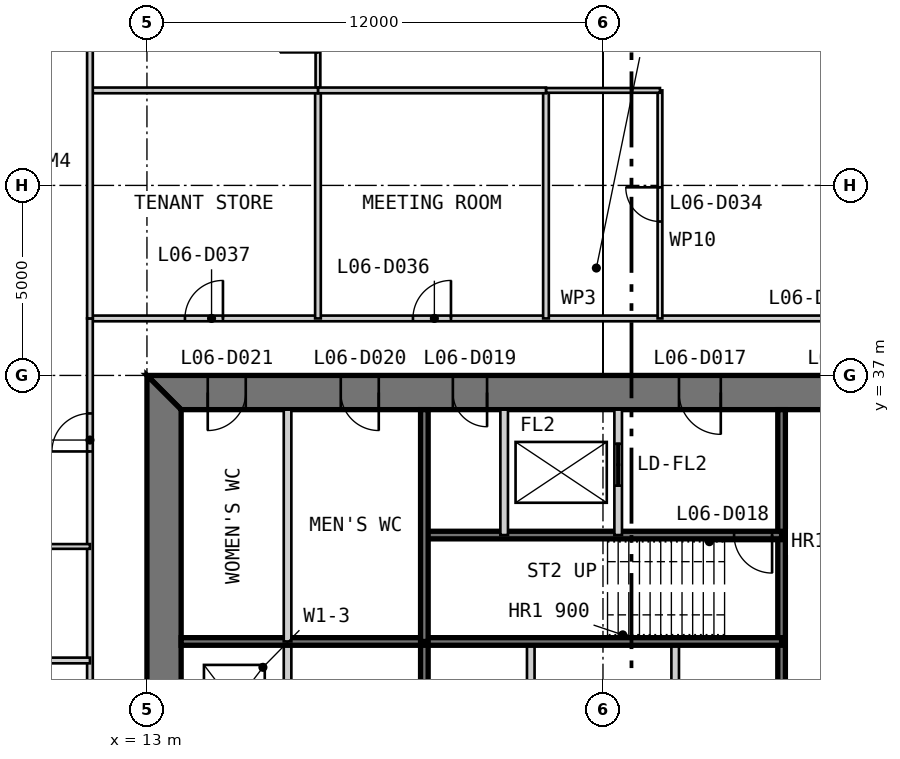
"""IFC4 building model, lengths in metres.
Left out: names, types, materials, properties, quantities, classifications, styles, units other than length and angle.
Written with IfcOpenShell. Run it as: python <this file> out.ifc"""

import sys

from ifc_helpers import new_model, si_unit, direction, frame, frame_2d, origin, place, context, subcontext, project, spatial, polyline, rectangle, outline, extrude, element, fill, save


model = new_model("IFC4")
c1 = context("Model", 3, precision=1e-05, world=origin(), true_north=direction((0.0, 1.0)))
c2 = subcontext(c1, "Body", "Model", "MODEL_VIEW")
j1 = project(units=[si_unit("LENGTHUNIT", "METRE"), si_unit("PLANEANGLEUNIT", "RADIAN")], contexts=[c1])
p1 = place(None, origin())
s1 = spatial("IfcSite", under=j1, at=p1, CompositionType="ELEMENT")
p2 = place(p1, origin())
s2 = spatial("IfcBuilding", under=s1, at=p2, CompositionType="ELEMENT")
p3 = place(p2, frame((0.0, 0.0, 31.0)))
s3 = spatial("IfcBuildingStorey", under=s2, at=p3, CompositionType="ELEMENT", Elevation=31.0)
p4 = place(p3, frame((37.0, 36.55, 0.0), z_axis=(0.0, 0.0, 1.0), x_axis=(-1.0, 0.0, 0.0)))
e1 = element("IfcWall", 1, at=p4, inside=s3, PredefinedType="SHEAR", context=c2, shape_type="SweptSolid", body=[
    extrude(outline(polyline([(0.0, -0.45), (24.0, -0.45), (23.1, 0.45), (0.9, 0.45), (0.0, -0.45)])), origin(), (0.0, 0.0, 1.0), 4.0),
])
p5 = place(p4, frame((4.9, 0.0, 0.0)))
e2 = element("IfcOpeningElement", 2, at=p5, cuts=e1, PredefinedType="OPENING", context=c2, shape_type="SweptSolid", body=[
    extrude(rectangle(XDim=1.0, YDim=2.2, at=frame_2d((0.5, 1.1))), frame((0.0, 0.46, 0.0), z_axis=(0.0, -1.0, 0.0), x_axis=(1.0, 0.0, 0.0)), (0.0, 0.0, 1.0), 0.92),
])
p6 = place(p4, frame((8.9, 0.0, 0.0)))
e3 = element("IfcOpeningElement", 3, at=p6, cuts=e1, PredefinedType="OPENING", context=c2, shape_type="SweptSolid", body=[
    extrude(rectangle(XDim=1.1, YDim=2.2, at=frame_2d((0.55, 1.1))), frame((0.0, 0.46, 0.0), z_axis=(0.0, -1.0, 0.0), x_axis=(1.0, 0.0, 0.0)), (0.0, 0.0, 1.0), 0.92),
])
p7 = place(p4, frame((15.05, 0.0, 0.0)))
e4 = element("IfcOpeningElement", 4, at=p7, cuts=e1, PredefinedType="OPENING", context=c2, shape_type="SweptSolid", body=[
    extrude(rectangle(XDim=0.9, YDim=2.2, at=frame_2d((0.45, 1.1))), frame((0.0, 0.46, 0.0), z_axis=(0.0, -1.0, 0.0), x_axis=(1.0, 0.0, 0.0)), (0.0, 0.0, 1.0), 0.92),
])
p8 = place(p4, frame((17.9, 0.0, 0.0)))
e5 = element("IfcOpeningElement", 5, at=p8, cuts=e1, PredefinedType="OPENING", context=c2, shape_type="SweptSolid", body=[
    extrude(rectangle(XDim=1.0, YDim=2.2, at=frame_2d((0.5, 1.1))), frame((0.0, 0.46, 0.0), z_axis=(0.0, -1.0, 0.0), x_axis=(1.0, 0.0, 0.0)), (0.0, 0.0, 1.0), 0.92),
])
p9 = place(p4, frame((21.4, 0.0, 0.0)))
e6 = element("IfcOpeningElement", 6, at=p9, cuts=e1, PredefinedType="OPENING", context=c2, shape_type="SweptSolid", body=[
    extrude(rectangle(XDim=1.0, YDim=2.2, at=frame_2d((0.5, 1.1))), frame((0.0, 0.46, 0.0), z_axis=(0.0, -1.0, 0.0), x_axis=(1.0, 0.0, 0.0)), (0.0, 0.0, 1.0), 0.92),
])
p10 = place(p3, frame((13.45, 36.1, 0.0), z_axis=(0.0, 0.0, 1.0), x_axis=(0.0, -1.0, 0.0)))
e7 = element("IfcWall", 7, at=p10, inside=s3, PredefinedType="SHEAR", context=c2, shape_type="SweptSolid", body=[
    extrude(outline(polyline([(-0.9, -0.45), (23.1, -0.45), (22.2, 0.45), (0.0, 0.45), (-0.9, -0.45)])), origin(), (0.0, 0.0, 1.0), 4.0),
])
p11 = place(p10, frame((20.2, 0.0, 0.0)))
e8 = element("IfcOpeningElement", 8, at=p11, cuts=e7, PredefinedType="OPENING", context=c2, shape_type="SweptSolid", body=[
    extrude(rectangle(XDim=1.0, YDim=2.2, at=frame_2d((0.5, 1.1))), frame((0.0, 0.46, 0.0), z_axis=(0.0, -1.0, 0.0), x_axis=(1.0, 0.0, 0.0)), (0.0, 0.0, 1.0), 0.92),
])
p12 = place(p10, frame((17.25, 0.0, 0.0)))
e9 = element("IfcOpeningElement", 9, at=p12, cuts=e7, PredefinedType="OPENING", context=c2, shape_type="SweptSolid", body=[
    extrude(rectangle(XDim=0.9, YDim=2.2, at=frame_2d((0.45, 1.1))), frame((0.0, 0.46, 0.0), z_axis=(0.0, -1.0, 0.0), x_axis=(1.0, 0.0, 0.0)), (0.0, 0.0, 1.0), 0.92),
])
p13 = place(p3, frame((16.7, 13.9, 0.0), z_axis=(0.0, 0.0, 1.0), x_axis=(0.0, 1.0, 0.0)))
e10 = element("IfcWall", 10, at=p13, inside=s3, PredefinedType="PARTITIONING", context=c2, shape_type="SweptSolid", body=[
    extrude(rectangle(XDim=16.1, YDim=0.2, at=frame_2d((8.05, 0.0))), origin(), (0.0, 0.0, 1.0), 3.8),
])
p14 = place(p13, frame((7.217, 0.0, 0.0)))
e11 = element("IfcOpeningElement", 11, at=p14, cuts=e10, PredefinedType="OPENING", context=c2, shape_type="SweptSolid", body=[
    extrude(rectangle(XDim=1.1, YDim=2.2, at=frame_2d((0.55, 1.1))), frame((0.0, 0.11, 0.0), z_axis=(0.0, -1.0, 0.0), x_axis=(1.0, 0.0, 0.0)), (0.0, 0.0, 1.0), 0.22),
])
p15 = place(p13, frame((10.55, 0.0, 0.0)))
e12 = element("IfcOpeningElement", 12, at=p15, cuts=e10, PredefinedType="OPENING", context=c2, shape_type="SweptSolid", body=[
    extrude(rectangle(XDim=1.1, YDim=2.2, at=frame_2d((0.55, 1.1))), frame((0.0, 0.11, 0.0), z_axis=(0.0, -1.0, 0.0), x_axis=(1.0, 0.0, 0.0)), (0.0, 0.0, 1.0), 0.22),
])
p16 = place(p13, frame((13.883, 0.0, 0.0)))
e13 = element("IfcOpeningElement", 13, at=p16, cuts=e10, PredefinedType="OPENING", context=c2, shape_type="SweptSolid", body=[
    extrude(rectangle(XDim=1.1, YDim=2.2, at=frame_2d((0.55, 1.1))), frame((0.0, 0.11, 0.0), z_axis=(0.0, -1.0, 0.0), x_axis=(1.0, 0.0, 0.0)), (0.0, 0.0, 1.0), 0.22),
])
p17 = place(p3, frame((20.3, 13.9, 0.0), z_axis=(0.0, 0.0, 1.0), x_axis=(0.0, 1.0, 0.0)))
e14 = element("IfcWall", 14, at=p17, inside=s3, PredefinedType="SOLIDWALL", context=c2, shape_type="SweptSolid", body=[
    extrude(rectangle(XDim=16.1, YDim=0.2, at=frame_2d((8.05, 0.0))), origin(), (0.0, 0.0, 1.0), 3.8),
])
p18 = place(p3, frame((23.1, 20.0, 0.0), z_axis=(0.0, 0.0, 1.0), x_axis=(0.0, 1.0, 0.0)))
e15 = element("IfcWall", 15, at=p18, inside=s3, PredefinedType="PARTITIONING", context=c2, shape_type="SweptSolid", body=[
    extrude(rectangle(XDim=10.0, YDim=0.2, at=frame_2d((5.0, 0.0))), origin(), (0.0, 0.0, 1.0), 3.8),
])
p19 = place(p3, frame((29.7, 36.1, 0.0), z_axis=(0.0, 0.0, 1.0), x_axis=(0.0, -1.0, 0.0)))
e16 = element("IfcWall", 16, at=p19, inside=s3, PredefinedType="SOLIDWALL", context=c2, shape_type="SweptSolid", body=[
    extrude(rectangle(XDim=16.1, YDim=0.2, at=frame_2d((8.05, 0.0))), origin(), (0.0, 0.0, 1.0), 3.8),
])
p20 = place(p3, frame((26.9, 30.0, 0.0), z_axis=(0.0, 0.0, 1.0), x_axis=(0.0, -1.0, 0.0)))
e17 = element("IfcWall", 17, at=p20, inside=s3, PredefinedType="PARTITIONING", context=c2, shape_type="SweptSolid", body=[
    extrude(rectangle(XDim=10.0, YDim=0.2, at=frame_2d((5.0, 0.0))), origin(), (0.0, 0.0, 1.0), 3.8),
])
p21 = place(p3, frame((29.7, 32.8, 0.0), z_axis=(0.0, 0.0, 1.0), x_axis=(-1.0, 0.0, 0.0)))
e18 = element("IfcWall", 18, at=p21, inside=s3, PredefinedType="SOLIDWALL", context=c2, shape_type="SweptSolid", body=[
    extrude(rectangle(XDim=9.4, YDim=0.2, at=frame_2d((4.7, 0.0))), origin(), (0.0, 0.0, 1.0), 3.8),
])
p22 = place(p21, frame((0.25, 0.0, 0.0)))
e19 = element("IfcOpeningElement", 19, at=p22, cuts=e18, PredefinedType="OPENING", context=c2, shape_type="SweptSolid", body=[
    extrude(rectangle(XDim=1.0, YDim=2.2, at=frame_2d((0.5, 1.1))), frame((0.0, 0.11, 0.0), z_axis=(0.0, -1.0, 0.0), x_axis=(1.0, 0.0, 0.0)), (0.0, 0.0, 1.0), 0.22),
])
p23 = place(p3, frame((29.7, 30.0, 0.0), z_axis=(0.0, 0.0, 1.0), x_axis=(-1.0, 0.0, 0.0)))
e20 = element("IfcWall", 20, at=p23, inside=s3, PredefinedType="SOLIDWALL", context=c2, shape_type="SweptSolid", body=[
    extrude(rectangle(XDim=15.8, YDim=0.2, at=frame_2d((7.9, 0.0))), origin(), (0.0, 0.0, 1.0), 3.8),
])
p24 = place(p3, frame((25.4, 36.1, 0.0), z_axis=(0.0, 0.0, 1.0), x_axis=(0.0, -1.0, 0.0)))
e21 = element("IfcWall", 21, at=p24, inside=s3, PredefinedType="PARTITIONING", context=c2, shape_type="SweptSolid", body=[
    extrude(rectangle(XDim=3.3, YDim=0.2, at=frame_2d((1.65, 0.0))), origin(), (0.0, 0.0, 1.0), 3.8),
])
p25 = place(p24, frame((0.9, 0.0, 0.0)))
e22 = element("IfcOpeningElement", 22, at=p25, cuts=e21, PredefinedType="OPENING", context=c2, shape_type="SweptSolid", body=[
    extrude(rectangle(XDim=1.1, YDim=2.2, at=frame_2d((0.55, 1.1))), frame((0.0, 0.11, 0.0), z_axis=(0.0, -1.0, 0.0), x_axis=(1.0, 0.0, 0.0)), (0.0, 0.0, 1.0), 0.22),
])
p26 = place(p3, frame((22.4, 36.1, 0.0), z_axis=(0.0, 0.0, 1.0), x_axis=(0.0, -1.0, 0.0)))
e23 = element("IfcWall", 23, at=p26, inside=s3, PredefinedType="PARTITIONING", context=c2, shape_type="SweptSolid", body=[
    extrude(rectangle(XDim=3.3, YDim=0.2, at=frame_2d((1.65, 0.0))), origin(), (0.0, 0.0, 1.0), 3.8),
])
p27 = place(p3, frame((20.3, 36.1, 0.0), z_axis=(0.0, 0.0, 1.0), x_axis=(0.0, -1.0, 0.0)))
e24 = element("IfcWall", 24, at=p27, inside=s3, PredefinedType="SOLIDWALL", context=c2, shape_type="SweptSolid", body=[
    extrude(rectangle(XDim=6.1, YDim=0.2, at=frame_2d((3.05, 0.0))), origin(), (0.0, 0.0, 1.0), 3.8),
])
p28 = place(p3, frame((16.7, 36.1, 0.0), z_axis=(0.0, 0.0, 1.0), x_axis=(0.0, -1.0, 0.0)))
e25 = element("IfcWall", 25, at=p28, inside=s3, PredefinedType="PARTITIONING", context=c2, shape_type="SweptSolid", body=[
    extrude(rectangle(XDim=6.1, YDim=0.2, at=frame_2d((3.05, 0.0))), origin(), (0.0, 0.0, 1.0), 3.8),
])
p29 = place(p3, frame((38.5, 38.5, 0.0), z_axis=(0.0, 0.0, 1.0), x_axis=(-1.0, 0.0, 0.0)))
e26 = element("IfcWall", 26, at=p29, inside=s3, PredefinedType="PARTITIONING", context=c2, shape_type="SweptSolid", body=[
    extrude(rectangle(XDim=27.0, YDim=0.15, at=frame_2d((13.5, 0.0))), origin(), (0.0, 0.0, 1.0), 3.85),
])
p30 = place(p29, frame((5.5, 0.0, 0.0)))
e27 = element("IfcOpeningElement", 27, at=p30, cuts=e26, PredefinedType="OPENING", context=c2, shape_type="SweptSolid", body=[
    extrude(rectangle(XDim=1.0, YDim=2.2, at=frame_2d((0.5, 1.1))), frame((0.0, 0.085, 0.0), z_axis=(0.0, -1.0, 0.0), x_axis=(1.0, 0.0, 0.0)), (0.0, 0.0, 1.0), 0.17),
])
p31 = place(p29, frame((17.5, 0.0, 0.0)))
e28 = element("IfcOpeningElement", 28, at=p31, cuts=e26, PredefinedType="OPENING", context=c2, shape_type="SweptSolid", body=[
    extrude(rectangle(XDim=1.0, YDim=2.2, at=frame_2d((0.5, 1.1))), frame((0.0, 0.085, 0.0), z_axis=(0.0, -1.0, 0.0), x_axis=(1.0, 0.0, 0.0)), (0.0, 0.0, 1.0), 0.17),
])
p32 = place(p29, frame((23.5, 0.0, 0.0)))
e29 = element("IfcOpeningElement", 29, at=p32, cuts=e26, PredefinedType="OPENING", context=c2, shape_type="SweptSolid", body=[
    extrude(rectangle(XDim=1.0, YDim=2.2, at=frame_2d((0.5, 1.1))), frame((0.0, 0.085, 0.0), z_axis=(0.0, -1.0, 0.0), x_axis=(1.0, 0.0, 0.0)), (0.0, 0.0, 1.0), 0.17),
])
p33 = place(p3, frame((26.5, 44.5, 0.0), z_axis=(0.0, 0.0, 1.0), x_axis=(0.0, -1.0, 0.0)))
e30 = element("IfcWall", 30, at=p33, inside=s3, PredefinedType="PARTITIONING", context=c2, shape_type="SweptSolid", body=[
    extrude(rectangle(XDim=6.0, YDim=0.125, at=frame_2d((3.0, 0.0))), origin(), (0.0, 0.0, 1.0), 3.85),
])
p34 = place(p33, frame((2.55, 0.0, 0.0)))
e31 = element("IfcOpeningElement", 31, at=p34, cuts=e30, PredefinedType="OPENING", context=c2, shape_type="SweptSolid", body=[
    extrude(rectangle(XDim=0.9, YDim=2.2, at=frame_2d((0.45, 1.1))), frame((0.0, 0.073, 0.0), z_axis=(0.0, -1.0, 0.0), x_axis=(1.0, 0.0, 0.0)), (0.0, 0.0, 1.0), 0.145),
])
p35 = place(p3, frame((23.5, 44.5, 0.0), z_axis=(0.0, 0.0, 1.0), x_axis=(0.0, -1.0, 0.0)))
e32 = element("IfcWall", 32, at=p35, inside=s3, PredefinedType="PARTITIONING", context=c2, shape_type="SweptSolid", body=[
    extrude(rectangle(XDim=6.0, YDim=0.15, at=frame_2d((3.0, 0.0))), origin(), (0.0, 0.0, 1.0), 3.85),
])
p36 = place(p3, frame((17.5, 49.85, 0.0), z_axis=(0.0, 0.0, 1.0), x_axis=(0.0, -1.0, 0.0)))
e33 = element("IfcWall", 33, at=p36, inside=s3, PredefinedType="PARTITIONING", context=c2, shape_type="SweptSolid", body=[
    extrude(rectangle(XDim=5.35, YDim=0.125, at=frame_2d((2.675, 0.0))), origin(), (0.0, 0.0, 1.0), 3.85),
])
p37 = place(p36, frame((3.35, 0.0, 0.0)))
e34 = element("IfcOpeningElement", 34, at=p37, cuts=e33, PredefinedType="OPENING", context=c2, shape_type="SweptSolid", body=[
    extrude(rectangle(XDim=1.0, YDim=2.2, at=frame_2d((0.5, 1.1))), frame((0.0, 0.073, 0.0), z_axis=(0.0, -1.0, 0.0), x_axis=(1.0, 0.0, 0.0)), (0.0, 0.0, 1.0), 0.145),
])
p38 = place(p3, frame((17.5, 44.5, 0.0), z_axis=(0.0, 0.0, 1.0), x_axis=(0.0, -1.0, 0.0)))
e35 = element("IfcWall", 35, at=p38, inside=s3, PredefinedType="PARTITIONING", context=c2, shape_type="SweptSolid", body=[
    extrude(rectangle(XDim=6.0, YDim=0.15, at=frame_2d((3.0, 0.0))), origin(), (0.0, 0.0, 1.0), 3.85),
])
p39 = place(p3, frame((26.5, 44.5, 0.0), z_axis=(0.0, 0.0, 1.0), x_axis=(-1.0, 0.0, 0.0)))
e36 = element("IfcWall", 36, at=p39, inside=s3, PredefinedType="PARTITIONING", context=c2, shape_type="SweptSolid", body=[
    extrude(rectangle(XDim=3.0, YDim=0.125, at=frame_2d((1.5, 0.0))), origin(), (0.0, 0.0, 1.0), 3.85),
])
for number, where, z_axis, x_axis in (
    (37, (23.5, 44.5, 0.0), (0.0, 0.0, 1.0), (-1.0, 0.0, 0.0)),
    (38, (17.5, 44.5, 0.0), (0.0, 0.0, 1.0), (-1.0, 0.0, 0.0)),
):
    element("IfcWall", number, at=place(p3, frame(where, z_axis=z_axis, x_axis=x_axis)), inside=s3, PredefinedType="PARTITIONING", context=c2, shape_type="SweptSolid", body=[
        extrude(rectangle(XDim=6.0, YDim=0.15, at=frame_2d((3.0, 0.0))), origin(), (0.0, 0.0, 1.0), 3.85),
    ])
p40 = place(p3, frame((11.5, 38.5, 0.0), z_axis=(0.0, 0.0, 1.0), x_axis=(0.0, -1.0, 0.0)))
e39 = element("IfcWall", 39, at=p40, inside=s3, PredefinedType="PARTITIONING", context=c2, shape_type="SweptSolid", body=[
    extrude(rectangle(XDim=27.0, YDim=0.15, at=frame_2d((13.5, 0.0))), origin(), (0.0, 0.0, 1.0), 3.85),
])
p41 = place(p40, frame((2.5, 0.0, 0.0)))
e40 = element("IfcOpeningElement", 40, at=p41, cuts=e39, PredefinedType="OPENING", context=c2, shape_type="SweptSolid", body=[
    extrude(rectangle(XDim=1.0, YDim=2.2, at=frame_2d((0.5, 1.1))), frame((0.0, 0.085, 0.0), z_axis=(0.0, -1.0, 0.0), x_axis=(1.0, 0.0, 0.0)), (0.0, 0.0, 1.0), 0.17),
])
p42 = place(p40, frame((11.5, 0.0, 0.0)))
e41 = element("IfcOpeningElement", 41, at=p42, cuts=e39, PredefinedType="OPENING", context=c2, shape_type="SweptSolid", body=[
    extrude(rectangle(XDim=1.0, YDim=2.2, at=frame_2d((0.5, 1.1))), frame((0.0, 0.085, 0.0), z_axis=(0.0, -1.0, 0.0), x_axis=(1.0, 0.0, 0.0)), (0.0, 0.0, 1.0), 0.17),
])
p43 = place(p40, frame((17.5, 0.0, 0.0)))
e42 = element("IfcOpeningElement", 42, at=p43, cuts=e39, PredefinedType="OPENING", context=c2, shape_type="SweptSolid", body=[
    extrude(rectangle(XDim=1.0, YDim=2.2, at=frame_2d((0.5, 1.1))), frame((0.0, 0.085, 0.0), z_axis=(0.0, -1.0, 0.0), x_axis=(1.0, 0.0, 0.0)), (0.0, 0.0, 1.0), 0.17),
])
p44 = place(p40, frame((22.0, 0.0, 0.0)))
e43 = element("IfcOpeningElement", 43, at=p44, cuts=e39, PredefinedType="OPENING", context=c2, shape_type="SweptSolid", body=[
    extrude(rectangle(XDim=1.0, YDim=2.2, at=frame_2d((0.5, 1.1))), frame((0.0, 0.085, 0.0), z_axis=(0.0, -1.0, 0.0), x_axis=(1.0, 0.0, 0.0)), (0.0, 0.0, 1.0), 0.17),
])
p45 = place(p40, frame((25.0, 0.0, 0.0)))
e44 = element("IfcOpeningElement", 44, at=p45, cuts=e39, PredefinedType="OPENING", context=c2, shape_type="SweptSolid", body=[
    extrude(rectangle(XDim=1.0, YDim=2.2, at=frame_2d((0.5, 1.1))), frame((0.0, 0.085, 0.0), z_axis=(0.0, -1.0, 0.0), x_axis=(1.0, 0.0, 0.0)), (0.0, 0.0, 1.0), 0.17),
])
p46 = place(p3, frame((11.5, 49.85, 0.0), z_axis=(0.0, 0.0, 1.0), x_axis=(0.0, -1.0, 0.0)))
e45 = element("IfcWall", 45, at=p46, inside=s3, PredefinedType="PARTITIONING", context=c2, shape_type="SweptSolid", body=[
    extrude(rectangle(XDim=11.35, YDim=0.15, at=frame_2d((5.675, 0.0))), origin(), (0.0, 0.0, 1.0), 3.85),
])
p47 = place(p3, frame((5.5, 32.5, 0.0), z_axis=(0.0, 0.0, 1.0), x_axis=(1.0, 0.0, 0.0)))
e46 = element("IfcWall", 46, at=p47, inside=s3, PredefinedType="PARTITIONING", context=c2, shape_type="SweptSolid", body=[
    extrude(rectangle(XDim=6.0, YDim=0.125, at=frame_2d((3.0, 0.0))), origin(), (0.0, 0.0, 1.0), 3.85),
])
p48 = place(p47, frame((2.55, 0.0, 0.0)))
e47 = element("IfcOpeningElement", 47, at=p48, cuts=e46, PredefinedType="OPENING", context=c2, shape_type="SweptSolid", body=[
    extrude(rectangle(XDim=0.9, YDim=2.2, at=frame_2d((0.45, 1.1))), frame((0.0, 0.073, 0.0), z_axis=(0.0, -1.0, 0.0), x_axis=(1.0, 0.0, 0.0)), (0.0, 0.0, 1.0), 0.145),
])
p49 = place(p3, frame((5.5, 29.5, 0.0), z_axis=(0.0, 0.0, 1.0), x_axis=(1.0, 0.0, 0.0)))
e48 = element("IfcWall", 48, at=p49, inside=s3, PredefinedType="PARTITIONING", context=c2, shape_type="SweptSolid", body=[
    extrude(rectangle(XDim=6.0, YDim=0.15, at=frame_2d((3.0, 0.0))), origin(), (0.0, 0.0, 1.0), 3.85),
])
p50 = place(p6, origin())
e49 = element("IfcDoor", 49, at=p50, inside=s3, OperationType="SINGLE_SWING_LEFT", PredefinedType="DOOR", context=c2, shape_type="SweptSolid", body=[
    extrude(rectangle(XDim=1.1, YDim=2.2, at=frame_2d((0.55, 1.1))), frame((0.0, 0.025, 0.0), z_axis=(0.0, -1.0, 0.0), x_axis=(1.0, 0.0, 0.0)), (0.0, 0.0, 1.0), 0.05),
    extrude(outline(polyline([(0.0, 0.0), (0.04, 0.0), (0.04, 2.16), (1.06, 2.16), (1.06, 0.0), (1.1, 0.0), (1.1, 2.2), (0.0, 2.2), (0.0, 0.0)])), frame((0.0, 0.3, 0.0), z_axis=(0.0, -1.0, 0.0), x_axis=(1.0, 0.0, 0.0)), (0.0, 0.0, 1.0), 0.6),
])
fill(e3, e49)
p51 = place(p22, origin())
e50 = element("IfcDoor", 50, at=p51, inside=s3, OperationType="SINGLE_SWING_LEFT", PredefinedType="DOOR", context=c2, shape_type="SweptSolid", body=[
    extrude(rectangle(XDim=1.0, YDim=2.2, at=frame_2d((0.5, 1.1))), frame((0.0, 0.025, 0.0), z_axis=(0.0, -1.0, 0.0), x_axis=(1.0, 0.0, 0.0)), (0.0, 0.0, 1.0), 0.05),
])
fill(e19, e50)
p52 = place(p7, origin())
e51 = element("IfcDoor", 51, at=p52, inside=s3, OperationType="SINGLE_SWING_LEFT", PredefinedType="DOOR", context=c2, shape_type="SweptSolid", body=[
    extrude(rectangle(XDim=0.9, YDim=2.2, at=frame_2d((0.45, 1.1))), frame((0.0, 0.025, 0.0), z_axis=(0.0, -1.0, 0.0), x_axis=(1.0, 0.0, 0.0)), (0.0, 0.0, 1.0), 0.05),
    extrude(outline(polyline([(0.0, 0.0), (0.04, 0.0), (0.04, 2.16), (0.86, 2.16), (0.86, 0.0), (0.9, 0.0), (0.9, 2.2), (0.0, 2.2), (0.0, 0.0)])), frame((0.0, 0.3, 0.0), z_axis=(0.0, -1.0, 0.0), x_axis=(1.0, 0.0, 0.0)), (0.0, 0.0, 1.0), 0.6),
])
fill(e4, e51)
p53 = place(p8, origin())
e52 = element("IfcDoor", 52, at=p53, inside=s3, OperationType="SINGLE_SWING_LEFT", PredefinedType="DOOR", context=c2, shape_type="SweptSolid", body=[
    extrude(rectangle(XDim=1.0, YDim=2.2, at=frame_2d((0.5, 1.1))), frame((0.0, 0.025, 0.0), z_axis=(0.0, -1.0, 0.0), x_axis=(1.0, 0.0, 0.0)), (0.0, 0.0, 1.0), 0.05),
    extrude(outline(polyline([(0.0, 0.0), (0.04, 0.0), (0.04, 2.16), (0.96, 2.16), (0.96, 0.0), (1.0, 0.0), (1.0, 2.2), (0.0, 2.2), (0.0, 0.0)])), frame((0.0, 0.3, 0.0), z_axis=(0.0, -1.0, 0.0), x_axis=(1.0, 0.0, 0.0)), (0.0, 0.0, 1.0), 0.6),
])
fill(e5, e52)
p54 = place(p9, origin())
e53 = element("IfcDoor", 53, at=p54, inside=s3, OperationType="SINGLE_SWING_RIGHT", PredefinedType="DOOR", context=c2, shape_type="SweptSolid", body=[
    extrude(rectangle(XDim=1.0, YDim=2.2, at=frame_2d((0.5, 1.1))), frame((0.0, 0.025, 0.0), z_axis=(0.0, -1.0, 0.0), x_axis=(1.0, 0.0, 0.0)), (0.0, 0.0, 1.0), 0.05),
    extrude(outline(polyline([(0.0, 0.0), (0.04, 0.0), (0.04, 2.16), (0.96, 2.16), (0.96, 0.0), (1.0, 0.0), (1.0, 2.2), (0.0, 2.2), (0.0, 0.0)])), frame((0.0, 0.3, 0.0), z_axis=(0.0, -1.0, 0.0), x_axis=(1.0, 0.0, 0.0)), (0.0, 0.0, 1.0), 0.6),
])
fill(e6, e53)
p55 = place(p34, frame((0.9, 0.0, 0.0), z_axis=(0.0, 0.0, 1.0), x_axis=(-1.0, 0.0, 0.0)))
e54 = element("IfcDoor", 54, at=p55, inside=s3, OperationType="SINGLE_SWING_RIGHT", PredefinedType="DOOR", context=c2, shape_type="SweptSolid", body=[
    extrude(rectangle(XDim=0.9, YDim=2.2, at=frame_2d((0.45, 1.1))), frame((0.0, 0.025, 0.0), z_axis=(0.0, -1.0, 0.0), x_axis=(1.0, 0.0, 0.0)), (0.0, 0.0, 1.0), 0.05),
])
fill(e31, e54)
p56 = place(p31, frame((1.0, 0.0, 0.0), z_axis=(0.0, 0.0, 1.0), x_axis=(-1.0, 0.0, 0.0)))
e55 = element("IfcDoor", 55, at=p56, inside=s3, OperationType="SINGLE_SWING_RIGHT", PredefinedType="DOOR", context=c2, shape_type="SweptSolid", body=[
    extrude(rectangle(XDim=1.0, YDim=2.2, at=frame_2d((0.5, 1.1))), frame((0.0, 0.025, 0.0), z_axis=(0.0, -1.0, 0.0), x_axis=(1.0, 0.0, 0.0)), (0.0, 0.0, 1.0), 0.05),
])
fill(e28, e55)
p57 = place(p32, frame((1.0, 0.0, 0.0), z_axis=(0.0, 0.0, 1.0), x_axis=(-1.0, 0.0, 0.0)))
e56 = element("IfcDoor", 56, at=p57, inside=s3, OperationType="SINGLE_SWING_RIGHT", PredefinedType="DOOR", context=c2, shape_type="SweptSolid", body=[
    extrude(rectangle(XDim=1.0, YDim=2.2, at=frame_2d((0.5, 1.1))), frame((0.0, 0.025, 0.0), z_axis=(0.0, -1.0, 0.0), x_axis=(1.0, 0.0, 0.0)), (0.0, 0.0, 1.0), 0.05),
])
fill(e29, e56)
p58 = place(p41, frame((1.0, 0.0, 0.0), z_axis=(0.0, 0.0, 1.0), x_axis=(-1.0, 0.0, 0.0)))
e57 = element("IfcDoor", 57, at=p58, inside=s3, OperationType="SINGLE_SWING_LEFT", PredefinedType="DOOR", context=c2, shape_type="SweptSolid", body=[
    extrude(rectangle(XDim=1.0, YDim=2.2, at=frame_2d((0.5, 1.1))), frame((0.0, 0.025, 0.0), z_axis=(0.0, -1.0, 0.0), x_axis=(1.0, 0.0, 0.0)), (0.0, 0.0, 1.0), 0.05),
])
fill(e40, e57)
p59 = place(p25, origin())
e58 = element("IfcDoor", 58, at=p59, inside=s3, OperationType="DOUBLE_DOOR_SLIDING", PredefinedType="DOOR", context=c2, shape_type="SweptSolid", body=[
    extrude(rectangle(XDim=1.1, YDim=2.2, at=frame_2d((0.55, 1.1))), frame((0.0, 0.025, 0.0), z_axis=(0.0, -1.0, 0.0), x_axis=(1.0, 0.0, 0.0)), (0.0, 0.0, 1.0), 0.05),
])
fill(e22, e58)
save(model, sys.argv[1])
